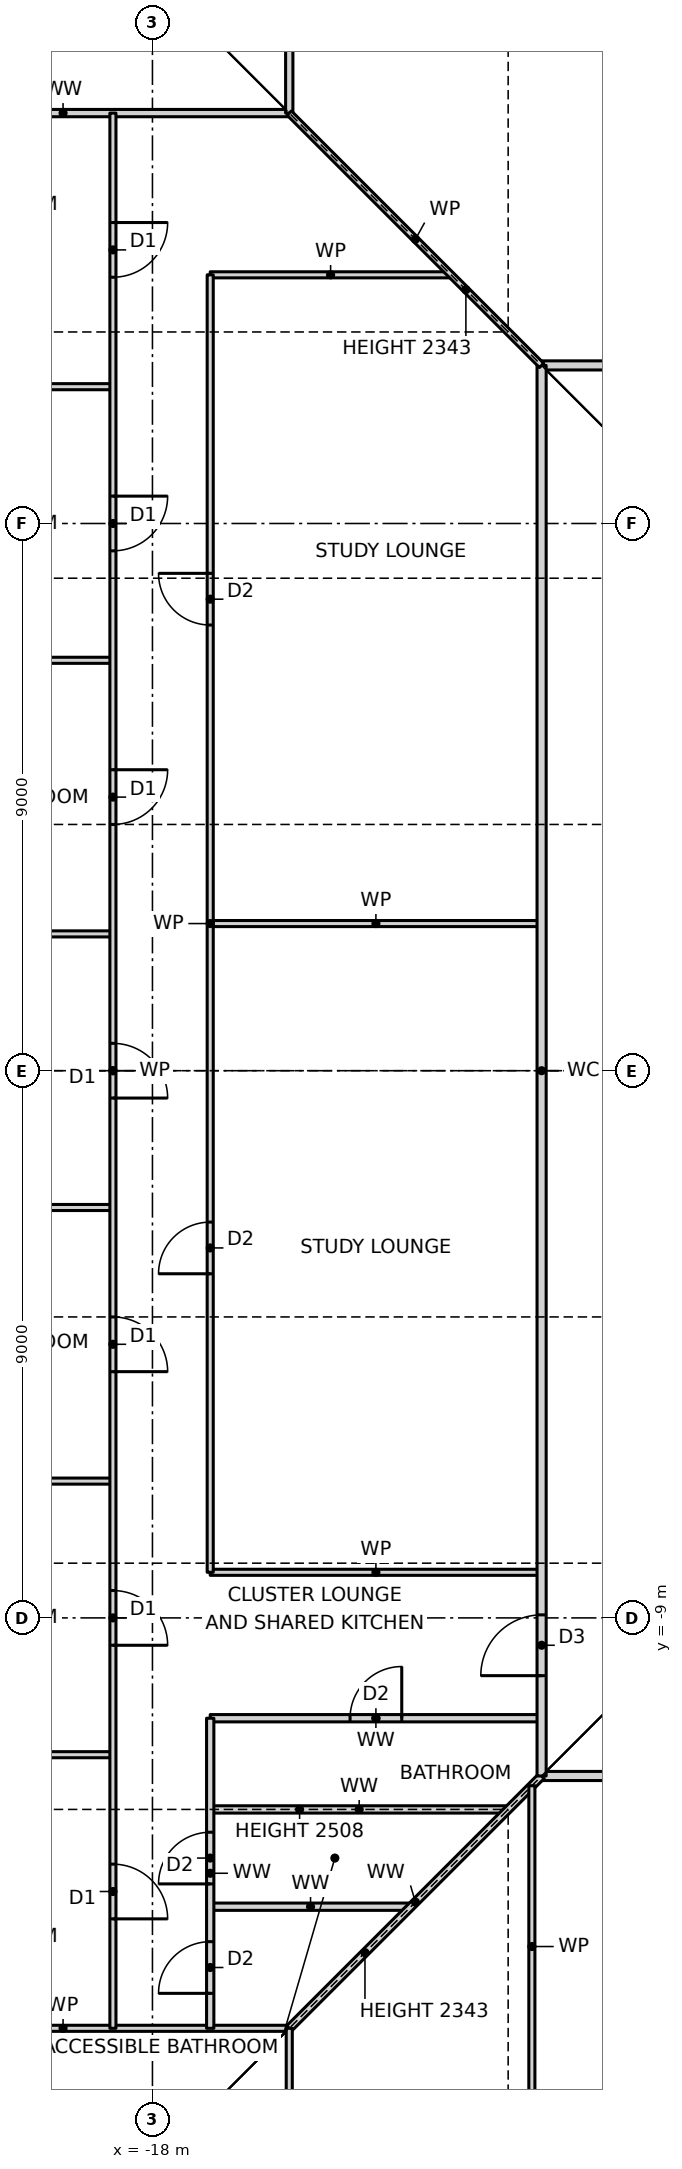
"""IFC4 building model, lengths in metres.
Left out: names, types, materials, properties, quantities, classifications, styles, units other than length and angle.
Written with IfcOpenShell. Run it as: python <this file> out.ifc"""

import sys

from ifc_helpers import new_model, si_unit, direction, frame, frame_2d, origin, place, context, subcontext, project, spatial, rectangle, extrude, element, fill, save


model = new_model("IFC4")
c1 = context("Model", 3, precision=1e-05, world=origin(), true_north=direction((0.0, 1.0)))
c2 = subcontext(c1, "Body", "Model", "MODEL_VIEW")
j1 = project(units=[si_unit("LENGTHUNIT", "METRE"), si_unit("PLANEANGLEUNIT", "RADIAN")], contexts=[c1])
p1 = place(None, origin())
s1 = spatial("IfcSite", under=j1, at=p1, CompositionType="ELEMENT")
p2 = place(p1, origin())
s2 = spatial("IfcBuilding", under=s1, at=p2, CompositionType="ELEMENT")
p3 = place(p2, frame((0.0, 0.0, 25.5)))
s3 = spatial("IfcBuildingStorey", under=s2, at=p3, CompositionType="ELEMENT", Elevation=25.5)
p4 = place(p3, frame((-23.19, -15.75, 0.0), z_axis=(0.0, 0.0, 1.0), x_axis=(1.0, 0.0, 0.0)))
e1 = element("IfcWall", 1, at=p4, inside=s3, PredefinedType="PARTITIONING", context=c2, shape_type="SweptSolid", body=[
    extrude(rectangle(XDim=7.44, YDim=0.1, at=frame_2d((3.72, 0.0))), origin(), (0.0, 0.0, 1.0), 3.27),
])
p5 = place(p3, frame((-17.05, -13.75, 0.0), z_axis=(0.0, 0.0, 1.0), x_axis=(1.0, 0.0, 0.0)))
e2 = element("IfcWall", 2, at=p5, inside=s3, PredefinedType="PARTITIONING", context=c2, shape_type="SweptSolid", body=[
    extrude(rectangle(XDim=3.3, YDim=0.12, at=frame_2d((1.65, 0.0))), origin(), (0.0, 0.0, 1.0), 3.27),
])
p6 = place(p3, frame((-17.05, -12.15, 0.0), z_axis=(0.0, 0.0, 1.0), x_axis=(1.0, 0.0, 0.0)))
e3 = element("IfcWall", 3, at=p6, inside=s3, PredefinedType="PARTITIONING", context=c2, shape_type="SweptSolid", body=[
    extrude(rectangle(XDim=4.9, YDim=0.12, at=frame_2d((2.45, 0.0))), origin(), (0.0, 0.0, 1.0), 2.508),
])
p7 = place(p3, frame((-11.6, -11.6, 0.0), z_axis=(0.0, 0.0, 1.0), x_axis=(1.0, 0.0, 0.0)))
e4 = element("IfcWall", 4, at=p7, inside=s3, PredefinedType="PARTITIONING", context=c2, shape_type="SweptSolid", body=[
    extrude(rectangle(XDim=24.2, YDim=0.15, at=frame_2d((12.1, 0.0))), origin(), (0.0, 0.0, 1.0), 3.27),
])
p8 = place(p7, frame((16.05, 0.0, 0.0)))
e5 = element("IfcOpeningElement", 5, at=p8, cuts=e4, PredefinedType="OPENING", context=c2, shape_type="SweptSolid", body=[
    extrude(rectangle(XDim=1.0, YDim=2.1, at=frame_2d((0.5, 1.05))), frame((0.0, 0.085, 0.0), z_axis=(0.0, -1.0, 0.0), x_axis=(1.0, 0.0, 0.0)), (0.0, 0.0, 1.0), 0.17),
])
p9 = place(p3, frame((-23.19, -11.25, 0.0), z_axis=(0.0, 0.0, 1.0), x_axis=(1.0, 0.0, 0.0)))
e6 = element("IfcWall", 6, at=p9, inside=s3, PredefinedType="PARTITIONING", context=c2, shape_type="SweptSolid", body=[
    extrude(rectangle(XDim=4.54, YDim=0.1, at=frame_2d((2.27, 0.0))), origin(), (0.0, 0.0, 1.0), 3.27),
])
p10 = place(p3, frame((-17.05, -10.65, 0.0), z_axis=(0.0, 0.0, 1.0), x_axis=(1.0, 0.0, 0.0)))
e7 = element("IfcWall", 7, at=p10, inside=s3, PredefinedType="PARTITIONING", context=c2, shape_type="SweptSolid", body=[
    extrude(rectangle(XDim=5.45, YDim=0.12, at=frame_2d((2.725, 0.0))), origin(), (0.0, 0.0, 1.0), 3.27),
])
p11 = place(p10, frame((2.3, 0.0, 0.0)))
e8 = element("IfcOpeningElement", 8, at=p11, cuts=e7, PredefinedType="OPENING", context=c2, shape_type="SweptSolid", body=[
    extrude(rectangle(XDim=0.85, YDim=2.1, at=frame_2d((0.425, 1.05))), frame((0.0, 0.07, 0.0), z_axis=(0.0, -1.0, 0.0), x_axis=(1.0, 0.0, 0.0)), (0.0, 0.0, 1.0), 0.14),
])
p12 = place(p3, frame((-17.05, -8.25, 0.0), z_axis=(0.0, 0.0, 1.0), x_axis=(1.0, 0.0, 0.0)))
e9 = element("IfcWall", 9, at=p12, inside=s3, PredefinedType="PARTITIONING", context=c2, shape_type="SweptSolid", body=[
    extrude(rectangle(XDim=5.45, YDim=0.1, at=frame_2d((2.725, 0.0))), origin(), (0.0, 0.0, 1.0), 3.27),
])
for number, where, z_axis, x_axis in (
    (10, (-23.19, -6.75, 0.0), (0.0, 0.0, 1.0), (1.0, 0.0, 0.0)),
    (11, (-23.19, -2.25, 0.0), (0.0, 0.0, 1.0), (1.0, 0.0, 0.0)),
    (12, (-23.19, 2.25, 0.0), (0.0, 0.0, 1.0), (1.0, 0.0, 0.0)),
):
    element("IfcWall", number, at=place(p3, frame(where, z_axis=z_axis, x_axis=x_axis)), inside=s3, PredefinedType="PARTITIONING", context=c2, shape_type="SweptSolid", body=[
        extrude(rectangle(XDim=4.54, YDim=0.1, at=frame_2d((2.27, 0.0))), origin(), (0.0, 0.0, 1.0), 3.27),
    ])
p13 = place(p3, frame((-17.05, 2.42, 0.0), z_axis=(0.0, 0.0, 1.0), x_axis=(1.0, 0.0, 0.0)))
e13 = element("IfcWall", 13, at=p13, inside=s3, PredefinedType="PARTITIONING", context=c2, shape_type="SweptSolid", body=[
    extrude(rectangle(XDim=5.45, YDim=0.1, at=frame_2d((2.725, 0.0))), origin(), (0.0, 0.0, 1.0), 3.27),
])
for number, where, z_axis, x_axis in (
    (14, (-23.19, 6.75, 0.0), (0.0, 0.0, 1.0), (1.0, 0.0, 0.0)),
    (15, (-23.19, 11.25, 0.0), (0.0, 0.0, 1.0), (1.0, 0.0, 0.0)),
):
    element("IfcWall", number, at=place(p3, frame(where, z_axis=z_axis, x_axis=x_axis)), inside=s3, PredefinedType="PARTITIONING", context=c2, shape_type="SweptSolid", body=[
        extrude(rectangle(XDim=4.54, YDim=0.1, at=frame_2d((2.27, 0.0))), origin(), (0.0, 0.0, 1.0), 3.27),
    ])
p14 = place(p3, frame((-11.6, 11.6, 0.0), z_axis=(0.0, 0.0, 1.0), x_axis=(1.0, 0.0, 0.0)))
e16 = element("IfcWall", 16, at=p14, inside=s3, PredefinedType="PARTITIONING", context=c2, shape_type="SweptSolid", body=[
    extrude(rectangle(XDim=24.2, YDim=0.15, at=frame_2d((12.1, 0.0))), origin(), (0.0, 0.0, 1.0), 3.27),
])
p15 = place(p14, frame((12.855, 0.0, 0.0)))
e17 = element("IfcOpeningElement", 17, at=p15, cuts=e16, PredefinedType="OPENING", context=c2, shape_type="SweptSolid", body=[
    extrude(rectangle(XDim=1.0, YDim=2.1, at=frame_2d((0.5, 1.05))), frame((0.0, 0.085, 0.0), z_axis=(0.0, -1.0, 0.0), x_axis=(1.0, 0.0, 0.0)), (0.0, 0.0, 1.0), 0.17),
])
p16 = place(p3, frame((-17.05, 13.09, 0.0), z_axis=(0.0, 0.0, 1.0), x_axis=(1.0, 0.0, 0.0)))
e18 = element("IfcWall", 18, at=p16, inside=s3, PredefinedType="PARTITIONING", context=c2, shape_type="SweptSolid", body=[
    extrude(rectangle(XDim=3.96, YDim=0.1, at=frame_2d((1.98, 0.0))), origin(), (0.0, 0.0, 1.0), 3.27),
])
p17 = place(p3, frame((-23.19, 15.75, 0.0), z_axis=(0.0, 0.0, 1.0), x_axis=(1.0, 0.0, 0.0)))
e19 = element("IfcWall", 19, at=p17, inside=s3, PredefinedType="PARTITIONING", context=c2, shape_type="SweptSolid", body=[
    extrude(rectangle(XDim=7.44, YDim=0.12, at=frame_2d((3.72, 0.0))), origin(), (0.0, 0.0, 1.0), 3.27),
])
p18 = place(p3, frame((-15.75, -15.75, 0.0), z_axis=(0.0, 0.0, 1.0), x_axis=(0.707106781187, 0.707106781187, 0.0)))
e20 = element("IfcWall", 20, at=p18, inside=s3, PredefinedType="PARTITIONING", context=c2, shape_type="SweptSolid", body=[
    extrude(rectangle(XDim=5.869, YDim=0.12, at=frame_2d((2.935, 0.0))), origin(), (0.0, 0.0, 1.0), 2.343),
])
p19 = place(p3, frame((-11.6, -11.6, 0.0), z_axis=(0.0, 0.0, 1.0), x_axis=(0.0, 1.0, 0.0)))
e21 = element("IfcWall", 21, at=p19, inside=s3, PredefinedType="PARTITIONING", context=c2, shape_type="SweptSolid", body=[
    extrude(rectangle(XDim=23.2, YDim=0.15, at=frame_2d((11.6, 0.0))), origin(), (0.0, 0.0, 1.0), 3.27),
])
p20 = place(p19, frame((1.65, 0.0, 0.0)))
e22 = element("IfcOpeningElement", 22, at=p20, cuts=e21, PredefinedType="OPENING", context=c2, shape_type="SweptSolid", body=[
    extrude(rectangle(XDim=1.0, YDim=2.1, at=frame_2d((0.5, 1.05))), frame((0.0, 0.085, 0.0), z_axis=(0.0, -1.0, 0.0), x_axis=(1.0, 0.0, 0.0)), (0.0, 0.0, 1.0), 0.17),
])
p21 = place(p3, frame((-11.76, -17.05, 0.0), z_axis=(0.0, 0.0, 1.0), x_axis=(0.0, 1.0, 0.0)))
e23 = element("IfcWall", 23, at=p21, inside=s3, PredefinedType="PARTITIONING", context=c2, shape_type="SweptSolid", body=[
    extrude(rectangle(XDim=5.29, YDim=0.1, at=frame_2d((2.645, 0.0))), origin(), (0.0, 0.0, 1.0), 3.27),
])
p22 = place(p3, frame((-15.75, -23.19, 0.0), z_axis=(0.0, 0.0, 1.0), x_axis=(0.0, 1.0, 0.0)))
e24 = element("IfcWall", 24, at=p22, inside=s3, PredefinedType="PARTITIONING", context=c2, shape_type="SweptSolid", body=[
    extrude(rectangle(XDim=7.44, YDim=0.1, at=frame_2d((3.72, 0.0))), origin(), (0.0, 0.0, 1.0), 3.27),
])
p23 = place(p22, frame((4.915, 0.0, 0.0)))
e25 = element("IfcOpeningElement", 25, at=p23, cuts=e24, PredefinedType="OPENING", context=c2, shape_type="SweptSolid", body=[
    extrude(rectangle(XDim=0.85, YDim=2.1, at=frame_2d((0.425, 1.05))), frame((0.0, 0.06, 0.0), z_axis=(0.0, -1.0, 0.0), x_axis=(1.0, 0.0, 0.0)), (0.0, 0.0, 1.0), 0.12),
])
p24 = place(p3, frame((-15.75, 15.75, 0.0), z_axis=(0.0, 0.0, 1.0), x_axis=(0.0, 1.0, 0.0)))
e26 = element("IfcWall", 26, at=p24, inside=s3, PredefinedType="PARTITIONING", context=c2, shape_type="SweptSolid", body=[
    extrude(rectangle(XDim=7.44, YDim=0.12, at=frame_2d((3.72, 0.0))), origin(), (0.0, 0.0, 1.0), 3.27),
])
p25 = place(p24, frame((1.675, 0.0, 0.0)))
e27 = element("IfcOpeningElement", 27, at=p25, cuts=e26, PredefinedType="OPENING", context=c2, shape_type="SweptSolid", body=[
    extrude(rectangle(XDim=0.85, YDim=2.1, at=frame_2d((0.425, 1.05))), frame((0.0, 0.07, 0.0), z_axis=(0.0, -1.0, 0.0), x_axis=(1.0, 0.0, 0.0)), (0.0, 0.0, 1.0), 0.14),
])
p26 = place(p3, frame((-17.05, -15.75, 0.0), z_axis=(0.0, 0.0, 1.0), x_axis=(0.0, 1.0, 0.0)))
e28 = element("IfcWall", 28, at=p26, inside=s3, PredefinedType="PARTITIONING", context=c2, shape_type="SweptSolid", body=[
    extrude(rectangle(XDim=5.1, YDim=0.12, at=frame_2d((2.55, 0.0))), origin(), (0.0, 0.0, 1.0), 3.27),
])
p27 = place(p26, frame((2.375, 0.0, 0.0)))
e29 = element("IfcOpeningElement", 29, at=p27, cuts=e28, PredefinedType="OPENING", context=c2, shape_type="SweptSolid", body=[
    extrude(rectangle(XDim=0.85, YDim=2.1, at=frame_2d((0.425, 1.05))), frame((0.0, 0.07, 0.0), z_axis=(0.0, -1.0, 0.0), x_axis=(1.0, 0.0, 0.0)), (0.0, 0.0, 1.0), 0.14),
])
p28 = place(p26, frame((0.575, 0.0, 0.0)))
e30 = element("IfcOpeningElement", 30, at=p28, cuts=e28, PredefinedType="OPENING", context=c2, shape_type="SweptSolid", body=[
    extrude(rectangle(XDim=0.85, YDim=2.1, at=frame_2d((0.425, 1.05))), frame((0.0, 0.07, 0.0), z_axis=(0.0, -1.0, 0.0), x_axis=(1.0, 0.0, 0.0)), (0.0, 0.0, 1.0), 0.14),
])
p29 = place(p3, frame((-17.05, -8.25, 0.0), z_axis=(0.0, 0.0, 1.0), x_axis=(0.0, 1.0, 0.0)))
e31 = element("IfcWall", 31, at=p29, inside=s3, PredefinedType="PARTITIONING", context=c2, shape_type="SweptSolid", body=[
    extrude(rectangle(XDim=21.34, YDim=0.1, at=frame_2d((10.67, 0.0))), origin(), (0.0, 0.0, 1.0), 3.27),
])
p30 = place(p29, frame((15.58, 0.0, 0.0)))
e32 = element("IfcOpeningElement", 32, at=p30, cuts=e31, PredefinedType="OPENING", context=c2, shape_type="SweptSolid", body=[
    extrude(rectangle(XDim=0.85, YDim=2.1, at=frame_2d((0.425, 1.05))), frame((0.0, 0.06, 0.0), z_axis=(0.0, -1.0, 0.0), x_axis=(1.0, 0.0, 0.0)), (0.0, 0.0, 1.0), 0.12),
])
p31 = place(p29, frame((4.91, 0.0, 0.0)))
e33 = element("IfcOpeningElement", 33, at=p31, cuts=e31, PredefinedType="OPENING", context=c2, shape_type="SweptSolid", body=[
    extrude(rectangle(XDim=0.85, YDim=2.1, at=frame_2d((0.425, 1.05))), frame((0.0, 0.06, 0.0), z_axis=(0.0, -1.0, 0.0), x_axis=(1.0, 0.0, 0.0)), (0.0, 0.0, 1.0), 0.12),
])
p32 = place(p3, frame((-18.65, -15.75, 0.0), z_axis=(0.0, 0.0, 1.0), x_axis=(0.0, 1.0, 0.0)))
e34 = element("IfcWall", 34, at=p32, inside=s3, PredefinedType="PARTITIONING", context=c2, shape_type="SweptSolid", body=[
    extrude(rectangle(XDim=31.5, YDim=0.1, at=frame_2d((15.75, 0.0))), origin(), (0.0, 0.0, 1.0), 3.27),
])
p33 = place(p32, frame((28.8, 0.0, 0.0)))
e35 = element("IfcOpeningElement", 35, at=p33, cuts=e34, PredefinedType="OPENING", context=c2, shape_type="SweptSolid", body=[
    extrude(rectangle(XDim=0.9, YDim=2.1, at=frame_2d((0.45, 1.05))), frame((0.0, 0.06, 0.0), z_axis=(0.0, -1.0, 0.0), x_axis=(1.0, 0.0, 0.0)), (0.0, 0.0, 1.0), 0.12),
])
p34 = place(p32, frame((24.3, 0.0, 0.0)))
e36 = element("IfcOpeningElement", 36, at=p34, cuts=e34, PredefinedType="OPENING", context=c2, shape_type="SweptSolid", body=[
    extrude(rectangle(XDim=0.9, YDim=2.1, at=frame_2d((0.45, 1.05))), frame((0.0, 0.06, 0.0), z_axis=(0.0, -1.0, 0.0), x_axis=(1.0, 0.0, 0.0)), (0.0, 0.0, 1.0), 0.12),
])
p35 = place(p32, frame((19.8, 0.0, 0.0)))
e37 = element("IfcOpeningElement", 37, at=p35, cuts=e34, PredefinedType="OPENING", context=c2, shape_type="SweptSolid", body=[
    extrude(rectangle(XDim=0.9, YDim=2.1, at=frame_2d((0.45, 1.05))), frame((0.0, 0.06, 0.0), z_axis=(0.0, -1.0, 0.0), x_axis=(1.0, 0.0, 0.0)), (0.0, 0.0, 1.0), 0.12),
])
p36 = place(p32, frame((15.3, 0.0, 0.0)))
e38 = element("IfcOpeningElement", 38, at=p36, cuts=e34, PredefinedType="OPENING", context=c2, shape_type="SweptSolid", body=[
    extrude(rectangle(XDim=0.9, YDim=2.1, at=frame_2d((0.45, 1.05))), frame((0.0, 0.06, 0.0), z_axis=(0.0, -1.0, 0.0), x_axis=(1.0, 0.0, 0.0)), (0.0, 0.0, 1.0), 0.12),
])
p37 = place(p32, frame((10.8, 0.0, 0.0)))
e39 = element("IfcOpeningElement", 39, at=p37, cuts=e34, PredefinedType="OPENING", context=c2, shape_type="SweptSolid", body=[
    extrude(rectangle(XDim=0.9, YDim=2.1, at=frame_2d((0.45, 1.05))), frame((0.0, 0.06, 0.0), z_axis=(0.0, -1.0, 0.0), x_axis=(1.0, 0.0, 0.0)), (0.0, 0.0, 1.0), 0.12),
])
p38 = place(p32, frame((6.3, 0.0, 0.0)))
e40 = element("IfcOpeningElement", 40, at=p38, cuts=e34, PredefinedType="OPENING", context=c2, shape_type="SweptSolid", body=[
    extrude(rectangle(XDim=0.9, YDim=2.1, at=frame_2d((0.45, 1.05))), frame((0.0, 0.06, 0.0), z_axis=(0.0, -1.0, 0.0), x_axis=(1.0, 0.0, 0.0)), (0.0, 0.0, 1.0), 0.12),
])
p39 = place(p32, frame((1.8, 0.0, 0.0)))
e41 = element("IfcOpeningElement", 41, at=p39, cuts=e34, PredefinedType="OPENING", context=c2, shape_type="SweptSolid", body=[
    extrude(rectangle(XDim=0.9, YDim=2.1, at=frame_2d((0.45, 1.05))), frame((0.0, 0.06, 0.0), z_axis=(0.0, -1.0, 0.0), x_axis=(1.0, 0.0, 0.0)), (0.0, 0.0, 1.0), 0.12),
])
p40 = place(p3, frame((-11.6, 11.6, 0.0), z_axis=(0.0, 0.0, 1.0), x_axis=(-0.707106781187, 0.707106781187, 0.0)))
e42 = element("IfcWall", 42, at=p40, inside=s3, PredefinedType="PARTITIONING", context=c2, shape_type="SweptSolid", body=[
    extrude(rectangle(XDim=5.869, YDim=0.1, at=frame_2d((2.935, 0.0))), origin(), (0.0, 0.0, 1.0), 2.343),
])
p41 = place(p33, frame((0.9, 0.0, 0.0), z_axis=(0.0, 0.0, 1.0), x_axis=(-1.0, 0.0, 0.0)))
e43 = element("IfcDoor", 43, at=p41, inside=s3, OperationType="SINGLE_SWING_LEFT", PredefinedType="DOOR", context=c2, shape_type="SweptSolid", body=[
    extrude(rectangle(XDim=0.9, YDim=2.1, at=frame_2d((0.45, 1.05))), frame((0.0, 0.025, 0.0), z_axis=(0.0, -1.0, 0.0), x_axis=(1.0, 0.0, 0.0)), (0.0, 0.0, 1.0), 0.05),
])
fill(e35, e43)
p42 = place(p34, frame((0.9, 0.0, 0.0), z_axis=(0.0, 0.0, 1.0), x_axis=(-1.0, 0.0, 0.0)))
e44 = element("IfcDoor", 44, at=p42, inside=s3, OperationType="SINGLE_SWING_LEFT", PredefinedType="DOOR", context=c2, shape_type="SweptSolid", body=[
    extrude(rectangle(XDim=0.9, YDim=2.1, at=frame_2d((0.45, 1.05))), frame((0.0, 0.025, 0.0), z_axis=(0.0, -1.0, 0.0), x_axis=(1.0, 0.0, 0.0)), (0.0, 0.0, 1.0), 0.05),
])
fill(e36, e44)
p43 = place(p35, frame((0.9, 0.0, 0.0), z_axis=(0.0, 0.0, 1.0), x_axis=(-1.0, 0.0, 0.0)))
e45 = element("IfcDoor", 45, at=p43, inside=s3, OperationType="SINGLE_SWING_LEFT", PredefinedType="DOOR", context=c2, shape_type="SweptSolid", body=[
    extrude(rectangle(XDim=0.9, YDim=2.1, at=frame_2d((0.45, 1.05))), frame((0.0, 0.025, 0.0), z_axis=(0.0, -1.0, 0.0), x_axis=(1.0, 0.0, 0.0)), (0.0, 0.0, 1.0), 0.05),
])
fill(e37, e45)
p44 = place(p36, frame((0.9, 0.0, 0.0), z_axis=(0.0, 0.0, 1.0), x_axis=(-1.0, 0.0, 0.0)))
e46 = element("IfcDoor", 46, at=p44, inside=s3, OperationType="SINGLE_SWING_RIGHT", PredefinedType="DOOR", context=c2, shape_type="SweptSolid", body=[
    extrude(rectangle(XDim=0.9, YDim=2.1, at=frame_2d((0.45, 1.05))), frame((0.0, 0.025, 0.0), z_axis=(0.0, -1.0, 0.0), x_axis=(1.0, 0.0, 0.0)), (0.0, 0.0, 1.0), 0.05),
])
fill(e38, e46)
p45 = place(p37, frame((0.9, 0.0, 0.0), z_axis=(0.0, 0.0, 1.0), x_axis=(-1.0, 0.0, 0.0)))
e47 = element("IfcDoor", 47, at=p45, inside=s3, OperationType="SINGLE_SWING_RIGHT", PredefinedType="DOOR", context=c2, shape_type="SweptSolid", body=[
    extrude(rectangle(XDim=0.9, YDim=2.1, at=frame_2d((0.45, 1.05))), frame((0.0, 0.025, 0.0), z_axis=(0.0, -1.0, 0.0), x_axis=(1.0, 0.0, 0.0)), (0.0, 0.0, 1.0), 0.05),
])
fill(e39, e47)
p46 = place(p38, frame((0.9, 0.0, 0.0), z_axis=(0.0, 0.0, 1.0), x_axis=(-1.0, 0.0, 0.0)))
e48 = element("IfcDoor", 48, at=p46, inside=s3, OperationType="SINGLE_SWING_RIGHT", PredefinedType="DOOR", context=c2, shape_type="SweptSolid", body=[
    extrude(rectangle(XDim=0.9, YDim=2.1, at=frame_2d((0.45, 1.05))), frame((0.0, 0.025, 0.0), z_axis=(0.0, -1.0, 0.0), x_axis=(1.0, 0.0, 0.0)), (0.0, 0.0, 1.0), 0.05),
])
fill(e40, e48)
p47 = place(p39, frame((0.9, 0.0, 0.0), z_axis=(0.0, 0.0, 1.0), x_axis=(-1.0, 0.0, 0.0)))
e49 = element("IfcDoor", 49, at=p47, inside=s3, OperationType="SINGLE_SWING_RIGHT", PredefinedType="DOOR", context=c2, shape_type="SweptSolid", body=[
    extrude(rectangle(XDim=0.9, YDim=2.1, at=frame_2d((0.45, 1.05))), frame((0.0, 0.025, 0.0), z_axis=(0.0, -1.0, 0.0), x_axis=(1.0, 0.0, 0.0)), (0.0, 0.0, 1.0), 0.05),
])
fill(e41, e49)
p48 = place(p20, origin())
e50 = element("IfcDoor", 50, at=p48, inside=s3, OperationType="SINGLE_SWING_LEFT", PredefinedType="DOOR", context=c2, shape_type="SweptSolid", body=[
    extrude(rectangle(XDim=1.0, YDim=2.1, at=frame_2d((0.5, 1.05))), frame((0.0, 0.025, 0.0), z_axis=(0.0, -1.0, 0.0), x_axis=(1.0, 0.0, 0.0)), (0.0, 0.0, 1.0), 0.05),
])
fill(e22, e50)
p49 = place(p30, origin())
e51 = element("IfcDoor", 51, at=p49, inside=s3, OperationType="SINGLE_SWING_RIGHT", PredefinedType="DOOR", context=c2, shape_type="SweptSolid", body=[
    extrude(rectangle(XDim=0.85, YDim=2.1, at=frame_2d((0.425, 1.05))), frame((0.0, 0.025, 0.0), z_axis=(0.0, -1.0, 0.0), x_axis=(1.0, 0.0, 0.0)), (0.0, 0.0, 1.0), 0.05),
])
fill(e32, e51)
p50 = place(p31, origin())
e52 = element("IfcDoor", 52, at=p50, inside=s3, OperationType="SINGLE_SWING_LEFT", PredefinedType="DOOR", context=c2, shape_type="SweptSolid", body=[
    extrude(rectangle(XDim=0.85, YDim=2.1, at=frame_2d((0.425, 1.05))), frame((0.0, 0.025, 0.0), z_axis=(0.0, -1.0, 0.0), x_axis=(1.0, 0.0, 0.0)), (0.0, 0.0, 1.0), 0.05),
])
fill(e33, e52)
p51 = place(p11, origin())
e53 = element("IfcDoor", 53, at=p51, inside=s3, OperationType="SINGLE_SWING_RIGHT", PredefinedType="DOOR", context=c2, shape_type="SweptSolid", body=[
    extrude(rectangle(XDim=0.85, YDim=2.1, at=frame_2d((0.425, 1.05))), frame((0.0, 0.025, 0.0), z_axis=(0.0, -1.0, 0.0), x_axis=(1.0, 0.0, 0.0)), (0.0, 0.0, 1.0), 0.05),
])
fill(e8, e53)
p52 = place(p27, origin())
e54 = element("IfcDoor", 54, at=p52, inside=s3, OperationType="SINGLE_SWING_LEFT", PredefinedType="DOOR", context=c2, shape_type="SweptSolid", body=[
    extrude(rectangle(XDim=0.85, YDim=2.1, at=frame_2d((0.425, 1.05))), frame((0.0, 0.025, 0.0), z_axis=(0.0, -1.0, 0.0), x_axis=(1.0, 0.0, 0.0)), (0.0, 0.0, 1.0), 0.05),
])
fill(e29, e54)
p53 = place(p28, origin())
e55 = element("IfcDoor", 55, at=p53, inside=s3, OperationType="SINGLE_SWING_LEFT", PredefinedType="DOOR", context=c2, shape_type="SweptSolid", body=[
    extrude(rectangle(XDim=0.85, YDim=2.1, at=frame_2d((0.425, 1.05))), frame((0.0, 0.025, 0.0), z_axis=(0.0, -1.0, 0.0), x_axis=(1.0, 0.0, 0.0)), (0.0, 0.0, 1.0), 0.05),
])
fill(e30, e55)
save(model, sys.argv[1])
